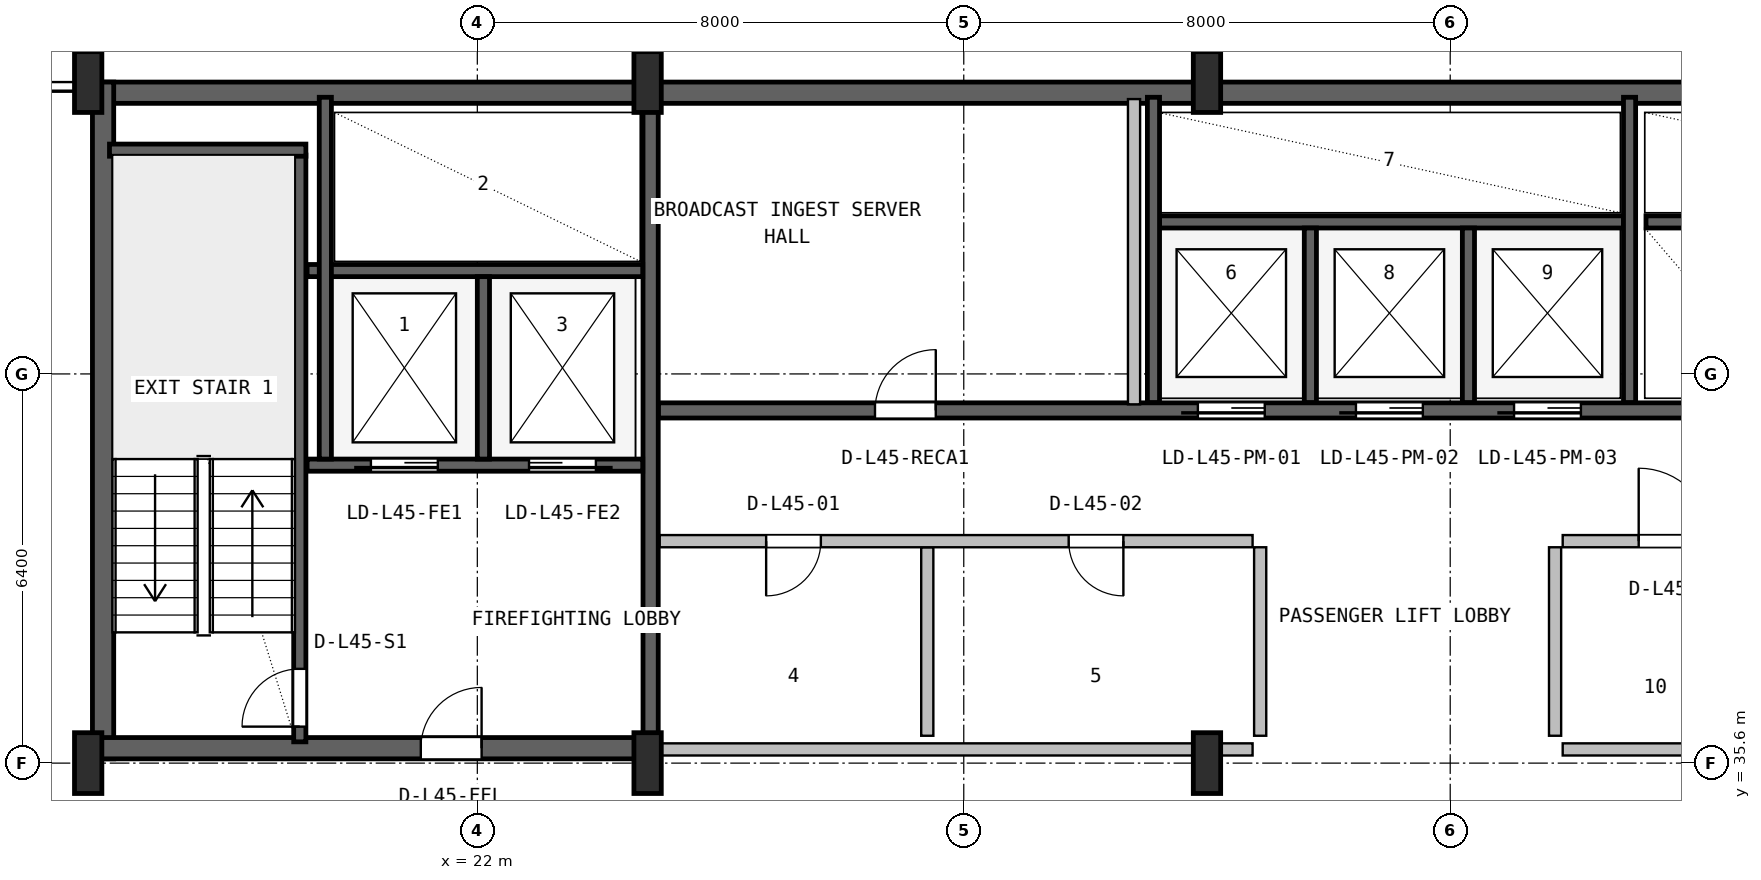
"""IFC4 building model, lengths in metres.
Left out: names, types, materials, properties, quantities, classifications, styles, units other than length and angle.
Written with IfcOpenShell. Run it as: python <this file> out.ifc"""

import sys

from ifc_helpers import new_model, si_unit, direction, frame, frame_2d, origin, origin_2d, place, context, subcontext, project, spatial, rectangle, i_section, extrude, source, transform, mapped, element, fill, save


model = new_model("IFC4")
c1 = context("Model", 3, precision=1e-05, world=origin(), true_north=direction((0.0, 1.0)))
c2 = subcontext(c1, "Body", "Model", "MODEL_VIEW")
j1 = project(units=[si_unit("LENGTHUNIT", "METRE"), si_unit("PLANEANGLEUNIT", "RADIAN")], contexts=[c1])
p1 = place(None, origin())
s1 = spatial("IfcSite", under=j1, at=p1, CompositionType="ELEMENT")
p2 = place(p1, origin())
s2 = spatial("IfcBuilding", under=s1, at=p2, CompositionType="ELEMENT")
p3 = place(p2, frame((0.0, 0.0, 183.8)))
s3 = spatial("IfcBuildingStorey", under=s2, at=p3, CompositionType="ELEMENT", Elevation=183.8)
p4 = place(p3, frame((15.6, 46.625, 0.0), z_axis=(0.0, 0.0, 1.0), x_axis=(1.0, 0.0, 0.0)))
e1 = element("IfcWall", 1, at=p4, inside=s3, PredefinedType="SHEAR", context=c2, shape_type="SweptSolid", body=[
    extrude(rectangle(XDim=36.8, YDim=0.35, at=frame_2d((18.4, 0.0))), origin(), (0.0, 0.0, 1.0), 3.55),
])
p5 = place(p3, frame((15.845, 35.67, 0.0), z_axis=(0.0, 0.0, 1.0), x_axis=(0.0, 1.0, 0.0)))
e2 = element("IfcWall", 2, at=p5, inside=s3, PredefinedType="SHEAR", context=c2, shape_type="SweptSolid", body=[
    extrude(rectangle(XDim=11.13, YDim=0.35, at=frame_2d((5.565, 0.0))), origin(), (0.0, 0.0, 1.0), 3.55),
])
p6 = place(p3, frame((15.67, 35.845, 0.0), z_axis=(0.0, 0.0, 1.0), x_axis=(1.0, 0.0, 0.0)))
e3 = element("IfcWall", 3, at=p6, inside=s3, PredefinedType="SHEAR", context=c2, shape_type="SweptSolid", body=[
    extrude(rectangle(XDim=9.13, YDim=0.35, at=frame_2d((4.565, 0.0))), origin(), (0.0, 0.0, 1.0), 3.55),
])
p7 = place(p6, frame((5.4, 0.0, 0.0)))
e4 = element("IfcOpeningElement", 4, at=p7, cuts=e3, PredefinedType="OPENING", context=c2, shape_type="SweptSolid", body=[
    extrude(rectangle(XDim=1.0, YDim=2.1, at=frame_2d((0.5, 1.05))), frame((0.0, 0.185, 0.0), z_axis=(0.0, -1.0, 0.0), x_axis=(1.0, 0.0, 0.0)), (0.0, 0.0, 1.0), 0.37),
])
m1 = source(origin(), c2, "Body", "SweptSolid", [
    extrude(i_section(OverallWidth=0.45, OverallDepth=1.0, WebThickness=0.016, FlangeThickness=0.03, FilletRadius=0.016, at=origin_2d()), origin(), (0.0, 0.0, 1.0), 3.8),
])
for number, where, z_axis, x_axis in (
    (5, (15.6, 35.6, 0.0), (0.0, 0.0, 1.0), (1.0, 0.0, 0.0)),
    (6, (15.6, 46.8, 0.0), (0.0, 0.0, 1.0), (1.0, 0.0, 0.0)),
    (7, (24.8, 35.6, 0.0), (0.0, 0.0, 1.0), (1.0, 0.0, 0.0)),
    (8, (24.8, 46.8, 0.0), (0.0, 0.0, 1.0), (1.0, 0.0, 0.0)),
    (9, (34.0, 35.6, 0.0), (0.0, 0.0, 1.0), (1.0, 0.0, 0.0)),
    (10, (34.0, 46.8, 0.0), (0.0, 0.0, 1.0), (1.0, 0.0, 0.0)),
):
    element("IfcColumn", number, at=place(p3, frame(where, z_axis=z_axis, x_axis=x_axis)), inside=s3, PredefinedType="COLUMN", context=c2, shape_type="MappedRepresentation", body=[
        mapped(m1, transform((0.0, 0.0, 0.0), x_axis=(1.0, 0.0, 0.0), y_axis=(0.0, 1.0, 0.0), z_axis=(0.0, 0.0, 1.0), scale=1.0)),
    ])
p8 = place(p3, frame((19.08, 35.95, 0.0), z_axis=(0.0, 0.0, 1.0), x_axis=(0.0, 1.0, 0.0)))
e11 = element("IfcWall", 11, at=p8, inside=s3, PredefinedType="SHEAR", context=c2, shape_type="SweptSolid", body=[
    extrude(rectangle(XDim=9.65, YDim=0.2, at=frame_2d((4.825, 0.0))), origin(), (0.0, 0.0, 1.0), 3.55),
])
p9 = place(p8, frame((0.25, 0.0, 0.0)))
e12 = element("IfcOpeningElement", 12, at=p9, cuts=e11, PredefinedType="OPENING", context=c2, shape_type="SweptSolid", body=[
    extrude(rectangle(XDim=0.95, YDim=2.1, at=frame_2d((0.475, 1.05))), frame((0.0, 0.11, 0.0), z_axis=(0.0, -1.0, 0.0), x_axis=(1.0, 0.0, 0.0)), (0.0, 0.0, 1.0), 0.22),
])
p10 = place(p3, frame((15.95, 45.68, 0.0), z_axis=(0.0, 0.0, 1.0), x_axis=(1.0, 0.0, 0.0)))
e13 = element("IfcWall", 13, at=p10, inside=s3, PredefinedType="SHEAR", context=c2, shape_type="SweptSolid", body=[
    extrude(rectangle(XDim=3.23, YDim=0.2, at=frame_2d((1.615, 0.0))), origin(), (0.0, 0.0, 1.0), 3.55),
])
p11 = place(p3, frame((24.85, 36.05, 0.0), z_axis=(0.0, 0.0, 1.0), x_axis=(0.0, 1.0, 0.0)))
e14 = element("IfcWall", 14, at=p11, inside=s3, PredefinedType="SHEAR", context=c2, shape_type="SweptSolid", body=[
    extrude(rectangle(XDim=10.45, YDim=0.25, at=frame_2d((5.225, 0.0))), origin(), (0.0, 0.0, 1.0), 3.55),
])
p12 = place(p3, frame((19.2, 40.5, 0.0), z_axis=(0.0, 0.0, 1.0), x_axis=(1.0, 0.0, 0.0)))
e15 = element("IfcWall", 15, at=p12, inside=s3, PredefinedType="SHEAR", context=c2, shape_type="SweptSolid", body=[
    extrude(rectangle(XDim=5.52, YDim=0.2, at=frame_2d((2.76, 0.0))), origin(), (0.0, 0.0, 1.0), 3.55),
])
p13 = place(p12, frame((1.05, 0.0, 0.0)))
e16 = element("IfcOpeningElement", 16, at=p13, cuts=e15, PredefinedType="OPENING", context=c2, shape_type="SweptSolid", body=[
    extrude(rectangle(XDim=1.1, YDim=2.18, at=frame_2d((0.55, 1.09))), frame((0.0, 0.11, 0.0), z_axis=(0.0, -1.0, 0.0), x_axis=(1.0, 0.0, 0.0)), (0.0, 0.0, 1.0), 0.22),
])
p14 = place(p12, frame((3.65, 0.0, 0.0)))
e17 = element("IfcOpeningElement", 17, at=p14, cuts=e15, PredefinedType="OPENING", context=c2, shape_type="SweptSolid", body=[
    extrude(rectangle(XDim=1.1, YDim=2.18, at=frame_2d((0.55, 1.09))), frame((0.0, 0.11, 0.0), z_axis=(0.0, -1.0, 0.0), x_axis=(1.0, 0.0, 0.0)), (0.0, 0.0, 1.0), 0.22),
])
p15 = place(p3, frame((19.2, 43.7, 0.0), z_axis=(0.0, 0.0, 1.0), x_axis=(1.0, 0.0, 0.0)))
e18 = element("IfcWall", 18, at=p15, inside=s3, PredefinedType="SHEAR", context=c2, shape_type="SweptSolid", body=[
    extrude(rectangle(XDim=5.52, YDim=0.2, at=frame_2d((2.76, 0.0))), origin(), (0.0, 0.0, 1.0), 3.55),
])
p16 = place(p3, frame((22.1, 40.6, 0.0), z_axis=(0.0, 0.0, 1.0), x_axis=(0.0, 1.0, 0.0)))
e19 = element("IfcWall", 19, at=p16, inside=s3, PredefinedType="SHEAR", context=c2, shape_type="SweptSolid", body=[
    extrude(rectangle(XDim=3.0, YDim=0.2, at=frame_2d((1.5, 0.0))), origin(), (0.0, 0.0, 1.0), 3.55),
])
p17 = place(p3, frame((19.5, 40.6, 0.0), z_axis=(0.0, 0.0, 1.0), x_axis=(0.0, 1.0, 0.0)))
e20 = element("IfcWall", 20, at=p17, inside=s3, PredefinedType="SHEAR", context=c2, shape_type="SweptSolid", body=[
    extrude(rectangle(XDim=5.95, YDim=0.2, at=frame_2d((2.975, 0.0))), origin(), (0.0, 0.0, 1.0), 3.55),
])
p18 = place(p3, frame((24.98, 41.4, 0.0), z_axis=(0.0, 0.0, 1.0), x_axis=(1.0, 0.0, 0.0)))
e21 = element("IfcWall", 21, at=p18, inside=s3, PredefinedType="SHEAR", context=c2, shape_type="SweptSolid", body=[
    extrude(rectangle(XDim=23.82, YDim=0.25, at=frame_2d((11.91, 0.0))), origin(), (0.0, 0.0, 1.0), 3.55),
])
p19 = place(p18, frame((8.87, 0.0, 0.0)))
e22 = element("IfcOpeningElement", 22, at=p19, cuts=e21, PredefinedType="OPENING", context=c2, shape_type="SweptSolid", body=[
    extrude(rectangle(XDim=1.1, YDim=2.18, at=frame_2d((0.55, 1.09))), frame((0.0, 0.135, 0.0), z_axis=(0.0, -1.0, 0.0), x_axis=(1.0, 0.0, 0.0)), (0.0, 0.0, 1.0), 0.27),
])
p20 = place(p18, frame((11.47, 0.0, 0.0)))
e23 = element("IfcOpeningElement", 23, at=p20, cuts=e21, PredefinedType="OPENING", context=c2, shape_type="SweptSolid", body=[
    extrude(rectangle(XDim=1.1, YDim=2.18, at=frame_2d((0.55, 1.09))), frame((0.0, 0.135, 0.0), z_axis=(0.0, -1.0, 0.0), x_axis=(1.0, 0.0, 0.0)), (0.0, 0.0, 1.0), 0.27),
])
p21 = place(p18, frame((14.07, 0.0, 0.0)))
e24 = element("IfcOpeningElement", 24, at=p21, cuts=e21, PredefinedType="OPENING", context=c2, shape_type="SweptSolid", body=[
    extrude(rectangle(XDim=1.1, YDim=2.18, at=frame_2d((0.55, 1.09))), frame((0.0, 0.135, 0.0), z_axis=(0.0, -1.0, 0.0), x_axis=(1.0, 0.0, 0.0)), (0.0, 0.0, 1.0), 0.27),
])
p22 = place(p18, frame((3.56, 0.0, 0.0)))
e25 = element("IfcOpeningElement", 25, at=p22, cuts=e21, PredefinedType="OPENING", context=c2, shape_type="SweptSolid", body=[
    extrude(rectangle(XDim=1.0, YDim=2.08, at=frame_2d((0.5, 1.04))), frame((0.0, 0.135, 0.0), z_axis=(0.0, -1.0, 0.0), x_axis=(1.0, 0.0, 0.0)), (0.0, 0.0, 1.0), 0.27),
])
p23 = place(p3, frame((33.22, 44.5, 0.0), z_axis=(0.0, 0.0, 1.0), x_axis=(1.0, 0.0, 0.0)))
e26 = element("IfcWall", 26, at=p23, inside=s3, PredefinedType="SHEAR", context=c2, shape_type="SweptSolid", body=[
    extrude(rectangle(XDim=7.63, YDim=0.2, at=frame_2d((3.815, 0.0))), origin(), (0.0, 0.0, 1.0), 3.55),
])
p24 = place(p3, frame((33.12, 41.53, 0.0), z_axis=(0.0, 0.0, 1.0), x_axis=(0.0, 1.0, 0.0)))
e27 = element("IfcWall", 27, at=p24, inside=s3, PredefinedType="SHEAR", context=c2, shape_type="SweptSolid", body=[
    extrude(rectangle(XDim=5.02, YDim=0.2, at=frame_2d((2.51, 0.0))), origin(), (0.0, 0.0, 1.0), 3.55),
])
for number, where, z_axis, x_axis in (
    (28, (35.7, 41.53, 0.0), (0.0, 0.0, 1.0), (0.0, 1.0, 0.0)),
    (29, (38.3, 41.53, 0.0), (0.0, 0.0, 1.0), (0.0, 1.0, 0.0)),
):
    element("IfcWall", number, at=place(p3, frame(where, z_axis=z_axis, x_axis=x_axis)), inside=s3, PredefinedType="SHEAR", context=c2, shape_type="SweptSolid", body=[
        extrude(rectangle(XDim=2.87, YDim=0.2, at=frame_2d((1.435, 0.0))), origin(), (0.0, 0.0, 1.0), 3.55),
    ])
p25 = place(p3, frame((40.95, 41.53, 0.0), z_axis=(0.0, 0.0, 1.0), x_axis=(0.0, 1.0, 0.0)))
e30 = element("IfcWall", 30, at=p25, inside=s3, PredefinedType="SHEAR", context=c2, shape_type="SweptSolid", body=[
    extrude(rectangle(XDim=5.02, YDim=0.2, at=frame_2d((2.51, 0.0))), origin(), (0.0, 0.0, 1.0), 3.55),
])
p26 = place(p3, frame((41.22, 44.5, 0.0), z_axis=(0.0, 0.0, 1.0), x_axis=(1.0, 0.0, 0.0)))
e31 = element("IfcWall", 31, at=p26, inside=s3, PredefinedType="SHEAR", context=c2, shape_type="SweptSolid", body=[
    extrude(rectangle(XDim=7.58, YDim=0.2, at=frame_2d((3.79, 0.0))), origin(), (0.0, 0.0, 1.0), 3.55),
])
p27 = place(p3, frame((25.0, 35.825, 0.0), z_axis=(0.0, 0.0, 1.0), x_axis=(1.0, 0.0, 0.0)))
e32 = element("IfcWall", 32, at=p27, inside=s3, PredefinedType="PLUMBINGWALL", context=c2, shape_type="SweptSolid", body=[
    extrude(rectangle(XDim=9.75, YDim=0.2, at=frame_2d((4.875, 0.0))), origin(), (0.0, 0.0, 1.0), 2.575),
])
p28 = place(p3, frame((29.4, 36.05, 0.0), z_axis=(0.0, 0.0, 1.0), x_axis=(0.0, 1.0, 0.0)))
e33 = element("IfcWall", 33, at=p28, inside=s3, PredefinedType="PLUMBINGWALL", context=c2, shape_type="SweptSolid", body=[
    extrude(rectangle(XDim=3.1, YDim=0.2, at=frame_2d((1.55, 0.0))), origin(), (0.0, 0.0, 1.0), 3.53),
])
p29 = place(p3, frame((25.0, 39.25, 0.0), z_axis=(0.0, 0.0, 1.0), x_axis=(1.0, 0.0, 0.0)))
e34 = element("IfcWall", 34, at=p29, inside=s3, PredefinedType="PLUMBINGWALL", context=c2, shape_type="SweptSolid", body=[
    extrude(rectangle(XDim=9.75, YDim=0.2, at=frame_2d((4.875, 0.0))), origin(), (0.0, 0.0, 1.0), 3.53),
])
p30 = place(p29, frame((1.75, 0.0, 0.0)))
e35 = element("IfcOpeningElement", 35, at=p30, cuts=e34, PredefinedType="OPENING", context=c2, shape_type="SweptSolid", body=[
    extrude(rectangle(XDim=0.9, YDim=2.06, at=frame_2d((0.45, 1.03))), frame((0.0, 0.11, 0.0), z_axis=(0.0, -1.0, 0.0), x_axis=(1.0, 0.0, 0.0)), (0.0, 0.0, 1.0), 0.22),
])
p31 = place(p29, frame((6.725, 0.0, 0.0)))
e36 = element("IfcOpeningElement", 36, at=p31, cuts=e34, PredefinedType="OPENING", context=c2, shape_type="SweptSolid", body=[
    extrude(rectangle(XDim=0.9, YDim=2.06, at=frame_2d((0.45, 1.03))), frame((0.0, 0.11, 0.0), z_axis=(0.0, -1.0, 0.0), x_axis=(1.0, 0.0, 0.0)), (0.0, 0.0, 1.0), 0.22),
])
p32 = place(p3, frame((34.875, 36.05, 0.0), z_axis=(0.0, 0.0, 1.0), x_axis=(0.0, 1.0, 0.0)))
e37 = element("IfcWall", 37, at=p32, inside=s3, PredefinedType="PLUMBINGWALL", context=c2, shape_type="SweptSolid", body=[
    extrude(rectangle(XDim=3.1, YDim=0.2, at=frame_2d((1.55, 0.0))), origin(), (0.0, 0.0, 1.0), 3.53),
])
p33 = place(p3, frame((39.85, 35.825, 0.0), z_axis=(0.0, 0.0, 1.0), x_axis=(1.0, 0.0, 0.0)))
e38 = element("IfcWall", 38, at=p33, inside=s3, PredefinedType="SOLIDWALL", context=c2, shape_type="SweptSolid", body=[
    extrude(rectangle(XDim=3.7, YDim=0.2, at=frame_2d((1.85, 0.0))), origin(), (0.0, 0.0, 1.0), 2.575),
])
p34 = place(p3, frame((39.85, 39.25, 0.0), z_axis=(0.0, 0.0, 1.0), x_axis=(1.0, 0.0, 0.0)))
e39 = element("IfcWall", 39, at=p34, inside=s3, PredefinedType="SOLIDWALL", context=c2, shape_type="SweptSolid", body=[
    extrude(rectangle(XDim=3.7, YDim=0.2, at=frame_2d((1.85, 0.0))), origin(), (0.0, 0.0, 1.0), 3.53),
])
p35 = place(p34, frame((1.25, 0.0, 0.0)))
e40 = element("IfcOpeningElement", 40, at=p35, cuts=e39, PredefinedType="OPENING", context=c2, shape_type="SweptSolid", body=[
    extrude(rectangle(XDim=1.2, YDim=2.1, at=frame_2d((0.6, 1.05))), frame((0.0, 0.11, 0.0), z_axis=(0.0, -1.0, 0.0), x_axis=(1.0, 0.0, 0.0)), (0.0, 0.0, 1.0), 0.22),
])
p36 = place(p3, frame((39.725, 36.05, 0.0), z_axis=(0.0, 0.0, 1.0), x_axis=(0.0, 1.0, 0.0)))
e41 = element("IfcWall", 41, at=p36, inside=s3, PredefinedType="SOLIDWALL", context=c2, shape_type="SweptSolid", body=[
    extrude(rectangle(XDim=3.1, YDim=0.2, at=frame_2d((1.55, 0.0))), origin(), (0.0, 0.0, 1.0), 3.53),
])
p37 = place(p3, frame((32.8, 41.5, 0.0), z_axis=(0.0, 0.0, 1.0), x_axis=(0.0, 1.0, 0.0)))
e42 = element("IfcWall", 42, at=p37, inside=s3, PredefinedType="SOLIDWALL", context=c2, shape_type="SweptSolid", body=[
    extrude(rectangle(XDim=5.02, YDim=0.2, at=frame_2d((2.51, 0.0))), origin(), (0.0, 0.0, 1.0), 3.53),
])
m2 = source(origin(), c2, "Body", "SweptSolid", [
    extrude(rectangle(XDim=0.95, YDim=2.1, at=frame_2d((0.475, 1.05))), frame((0.0, 0.025, 0.0), z_axis=(0.0, -1.0, 0.0), x_axis=(1.0, 0.0, 0.0)), (0.0, 0.0, 1.0), 0.05),
])
p38 = place(p9, origin())
e43 = element("IfcDoor", 43, at=p38, inside=s3, OperationType="SINGLE_SWING_LEFT", PredefinedType="DOOR", context=c2, shape_type="MappedRepresentation", body=[
    mapped(m2, transform((0.0, 0.0, 0.0), x_axis=(1.0, 0.0, 0.0), y_axis=(0.0, 1.0, 0.0), z_axis=(0.0, 0.0, 1.0), scale=1.0)),
])
fill(e12, e43)
m3 = source(origin(), c2, "Body", "SweptSolid", [
    extrude(rectangle(XDim=1.0, YDim=2.1, at=frame_2d((0.5, 1.05))), frame((0.0, 0.025, 0.0), z_axis=(0.0, -1.0, 0.0), x_axis=(1.0, 0.0, 0.0)), (0.0, 0.0, 1.0), 0.05),
])
p39 = place(p7, origin())
e44 = element("IfcDoor", 44, at=p39, inside=s3, OperationType="SINGLE_SWING_RIGHT", PredefinedType="DOOR", context=c2, shape_type="MappedRepresentation", body=[
    mapped(m3, transform((0.0, 0.0, 0.0), x_axis=(1.0, 0.0, 0.0), y_axis=(0.0, 1.0, 0.0), z_axis=(0.0, 0.0, 1.0), scale=1.0)),
])
fill(e4, e44)
m4 = source(origin(), c2, "Body", "SweptSolid", [
    extrude(rectangle(XDim=1.1, YDim=2.18, at=frame_2d((0.55, 1.09))), frame((0.0, 0.025, 0.0), z_axis=(0.0, -1.0, 0.0), x_axis=(1.0, 0.0, 0.0)), (0.0, 0.0, 1.0), 0.05),
])
p40 = place(p13, frame((1.1, 0.0, 0.0), z_axis=(0.0, 0.0, 1.0), x_axis=(-1.0, 0.0, 0.0)))
e45 = element("IfcDoor", 45, at=p40, inside=s3, OperationType="SLIDING_TO_LEFT", PredefinedType="DOOR", context=c2, shape_type="MappedRepresentation", body=[
    mapped(m4, transform((0.0, 0.0, 0.0), x_axis=(1.0, 0.0, 0.0), y_axis=(0.0, 1.0, 0.0), z_axis=(0.0, 0.0, 1.0), scale=1.0)),
])
fill(e16, e45)
p41 = place(p14, frame((1.1, 0.0, 0.0), z_axis=(0.0, 0.0, 1.0), x_axis=(-1.0, 0.0, 0.0)))
e46 = element("IfcDoor", 46, at=p41, inside=s3, OperationType="SLIDING_TO_RIGHT", PredefinedType="DOOR", context=c2, shape_type="MappedRepresentation", body=[
    mapped(m4, transform((0.0, 0.0, 0.0), x_axis=(1.0, 0.0, 0.0), y_axis=(0.0, 1.0, 0.0), z_axis=(0.0, 0.0, 1.0), scale=1.0)),
])
fill(e17, e46)
p42 = place(p19, frame((1.1, 0.0, 0.0), z_axis=(0.0, 0.0, 1.0), x_axis=(-1.0, 0.0, 0.0)))
e47 = element("IfcDoor", 47, at=p42, inside=s3, OperationType="SLIDING_TO_LEFT", PredefinedType="DOOR", context=c2, shape_type="MappedRepresentation", body=[
    mapped(m4, transform((0.0, 0.0, 0.0), x_axis=(1.0, 0.0, 0.0), y_axis=(0.0, 1.0, 0.0), z_axis=(0.0, 0.0, 1.0), scale=1.0)),
])
fill(e22, e47)
p43 = place(p20, frame((1.1, 0.0, 0.0), z_axis=(0.0, 0.0, 1.0), x_axis=(-1.0, 0.0, 0.0)))
e48 = element("IfcDoor", 48, at=p43, inside=s3, OperationType="SLIDING_TO_LEFT", PredefinedType="DOOR", context=c2, shape_type="MappedRepresentation", body=[
    mapped(m4, transform((0.0, 0.0, 0.0), x_axis=(1.0, 0.0, 0.0), y_axis=(0.0, 1.0, 0.0), z_axis=(0.0, 0.0, 1.0), scale=1.0)),
])
fill(e23, e48)
p44 = place(p21, frame((1.1, 0.0, 0.0), z_axis=(0.0, 0.0, 1.0), x_axis=(-1.0, 0.0, 0.0)))
e49 = element("IfcDoor", 49, at=p44, inside=s3, OperationType="SLIDING_TO_LEFT", PredefinedType="DOOR", context=c2, shape_type="MappedRepresentation", body=[
    mapped(m4, transform((0.0, 0.0, 0.0), x_axis=(1.0, 0.0, 0.0), y_axis=(0.0, 1.0, 0.0), z_axis=(0.0, 0.0, 1.0), scale=1.0)),
])
fill(e24, e49)
m5 = source(origin(), c2, "Body", "SweptSolid", [
    extrude(rectangle(XDim=1.0, YDim=2.08, at=frame_2d((0.5, 1.04))), frame((0.0, 0.025, 0.0), z_axis=(0.0, -1.0, 0.0), x_axis=(1.0, 0.0, 0.0)), (0.0, 0.0, 1.0), 0.05),
])
p45 = place(p22, origin())
e50 = element("IfcDoor", 50, at=p45, inside=s3, OperationType="SINGLE_SWING_RIGHT", PredefinedType="DOOR", context=c2, shape_type="MappedRepresentation", body=[
    mapped(m5, transform((0.0, 0.0, 0.0), x_axis=(1.0, 0.0, 0.0), y_axis=(0.0, 1.0, 0.0), z_axis=(0.0, 0.0, 1.0), scale=1.0)),
])
fill(e25, e50)
m6 = source(origin(), c2, "Body", "SweptSolid", [
    extrude(rectangle(XDim=0.9, YDim=2.06, at=frame_2d((0.45, 1.03))), frame((0.0, 0.025, 0.0), z_axis=(0.0, -1.0, 0.0), x_axis=(1.0, 0.0, 0.0)), (0.0, 0.0, 1.0), 0.05),
])
p46 = place(p30, frame((0.9, 0.0, 0.0), z_axis=(0.0, 0.0, 1.0), x_axis=(-1.0, 0.0, 0.0)))
e51 = element("IfcDoor", 51, at=p46, inside=s3, OperationType="SINGLE_SWING_LEFT", PredefinedType="DOOR", context=c2, shape_type="MappedRepresentation", body=[
    mapped(m6, transform((0.0, 0.0, 0.0), x_axis=(1.0, 0.0, 0.0), y_axis=(0.0, 1.0, 0.0), z_axis=(0.0, 0.0, 1.0), scale=1.0)),
])
fill(e35, e51)
p47 = place(p31, frame((0.9, 0.0, 0.0), z_axis=(0.0, 0.0, 1.0), x_axis=(-1.0, 0.0, 0.0)))
e52 = element("IfcDoor", 52, at=p47, inside=s3, OperationType="SINGLE_SWING_RIGHT", PredefinedType="DOOR", context=c2, shape_type="MappedRepresentation", body=[
    mapped(m6, transform((0.0, 0.0, 0.0), x_axis=(1.0, 0.0, 0.0), y_axis=(0.0, 1.0, 0.0), z_axis=(0.0, 0.0, 1.0), scale=1.0)),
])
fill(e36, e52)
m7 = source(origin(), c2, "Body", "SweptSolid", [
    extrude(rectangle(XDim=1.2, YDim=2.1, at=frame_2d((0.6, 1.05))), frame((0.0, 0.025, 0.0), z_axis=(0.0, -1.0, 0.0), x_axis=(1.0, 0.0, 0.0)), (0.0, 0.0, 1.0), 0.05),
])
p48 = place(p35, origin())
e53 = element("IfcDoor", 53, at=p48, inside=s3, OperationType="SINGLE_SWING_LEFT", PredefinedType="DOOR", context=c2, shape_type="MappedRepresentation", body=[
    mapped(m7, transform((0.0, 0.0, 0.0), x_axis=(1.0, 0.0, 0.0), y_axis=(0.0, 1.0, 0.0), z_axis=(0.0, 0.0, 1.0), scale=1.0)),
])
fill(e40, e53)
save(model, sys.argv[1])
